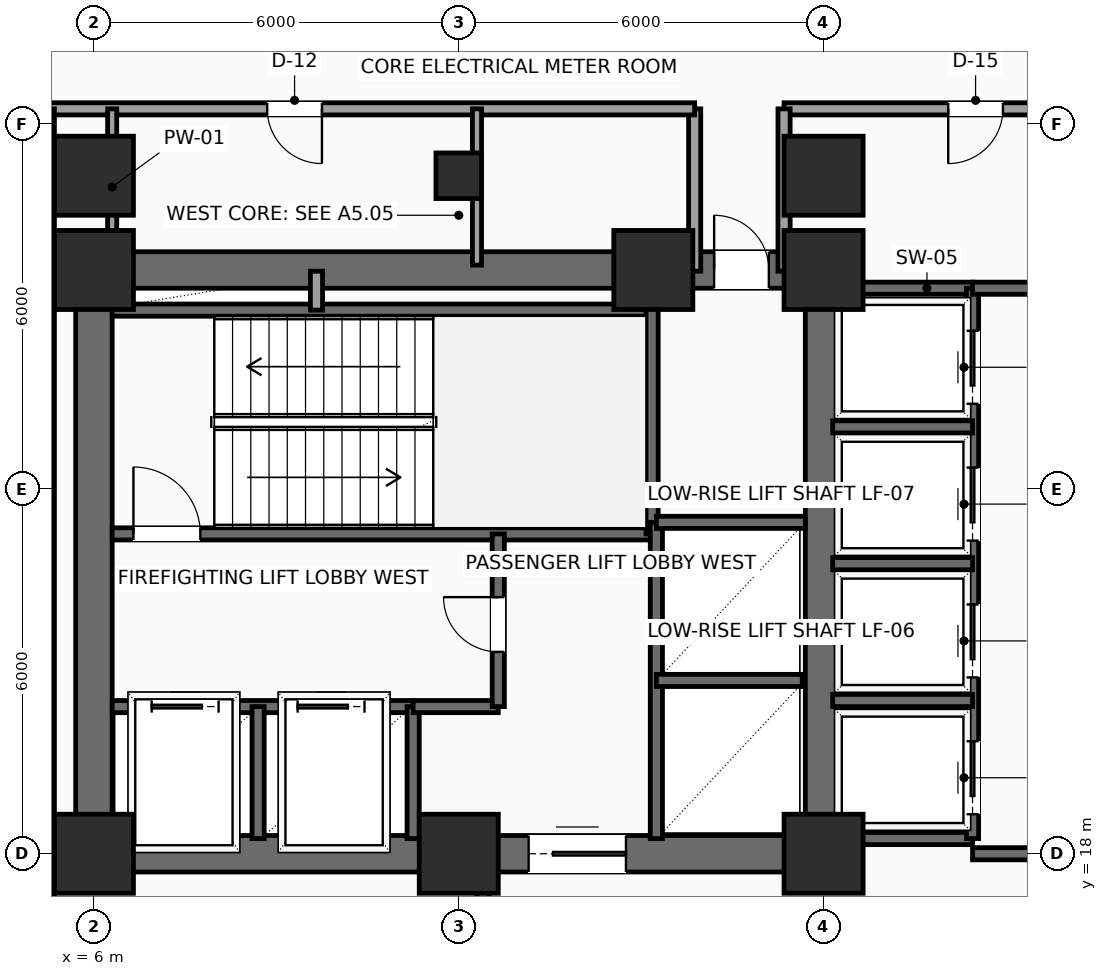
"""IFC4 building model, lengths in metres.
Left out: names, types, materials, properties, quantities, classifications, styles, units other than length and angle.
Written with IfcOpenShell. Run it as: python <this file> out.ifc"""

import sys

from ifc_helpers import new_model, si_unit, direction, frame, frame_2d, origin, origin_2d, place, context, subcontext, project, spatial, rectangle, hollow_rectangle, extrude, element, fill, save


model = new_model("IFC4")
c1 = context("Model", 3, precision=1e-05, world=origin(), true_north=direction((0.0, 1.0)))
c2 = subcontext(c1, "Body", "Model", "MODEL_VIEW")
j1 = project(units=[si_unit("LENGTHUNIT", "METRE"), si_unit("PLANEANGLEUNIT", "RADIAN")], contexts=[c1])
p1 = place(None, origin())
s1 = spatial("IfcSite", under=j1, at=p1, CompositionType="ELEMENT")
p2 = place(p1, origin())
s2 = spatial("IfcBuilding", under=s1, at=p2, CompositionType="ELEMENT")
p3 = place(p2, frame((0.0, 0.0, 90.9)))
s3 = spatial("IfcBuildingStorey", under=s2, at=p3, CompositionType="ELEMENT", Elevation=90.9)
for number, where, z_axis, x_axis in (
    (1, (6.0, 18.0, 0.0), (0.0, 0.0, 1.0), (1.0, 0.0, 0.0)),
    (2, (12.0, 18.0, 0.0), (0.0, 0.0, 1.0), (1.0, 0.0, 0.0)),
    (3, (18.0, 18.0, 0.0), (0.0, 0.0, 1.0), (1.0, 0.0, 0.0)),
    (4, (6.0, 27.6, 0.0), (0.0, 0.0, 1.0), (1.0, 0.0, 0.0)),
    (5, (15.2, 27.6, 0.0), (0.0, 0.0, 1.0), (1.0, 0.0, 0.0)),
    (6, (18.0, 27.6, 0.0), (0.0, 0.0, 1.0), (1.0, 0.0, 0.0)),
    (7, (6.0, 29.15, 0.0), (0.0, 0.0, 1.0), (1.0, 0.0, 0.0)),
):
    element("IfcColumn", number, at=place(p3, frame(where, z_axis=z_axis, x_axis=x_axis)), inside=s3, PredefinedType="COLUMN", context=c2, shape_type="SweptSolid", body=[
        extrude(rectangle(XDim=1.3, YDim=1.3, at=origin_2d()), origin(), (0.0, 0.0, 1.0), 3.9),
    ])
p4 = place(p3, frame((12.0, 29.15, 0.0), z_axis=(0.0, 0.0, 1.0), x_axis=(1.0, 0.0, 0.0)))
e8 = element("IfcColumn", 8, at=p4, inside=s3, PredefinedType="COLUMN", context=c2, shape_type="SweptSolid", body=[
    extrude(hollow_rectangle(XDim=0.75, YDim=0.75, WallThickness=0.035, InnerFilletRadius=0.035, OuterFilletRadius=0.05, at=origin_2d()), origin(), (0.0, 0.0, 1.0), 3.9),
])
p5 = place(p3, frame((18.0, 29.15, 0.0), z_axis=(0.0, 0.0, 1.0), x_axis=(1.0, 0.0, 0.0)))
e9 = element("IfcColumn", 9, at=p5, inside=s3, PredefinedType="COLUMN", context=c2, shape_type="SweptSolid", body=[
    extrude(rectangle(XDim=1.3, YDim=1.3, at=origin_2d()), origin(), (0.0, 0.0, 1.0), 3.9),
])
p6 = place(p3, frame((6.0, 18.0, 0.0), z_axis=(0.0, 0.0, 1.0), x_axis=(1.0, 0.0, 0.0)))
e10 = element("IfcWall", 10, at=p6, inside=s3, PredefinedType="SHEAR", context=c2, shape_type="SweptSolid", body=[
    extrude(rectangle(XDim=12.0, YDim=0.6, at=frame_2d((6.0, 0.0))), origin(), (0.0, 0.0, 1.0), 3.575),
])
p7 = place(p6, frame((7.15, 0.0, 0.0)))
e11 = element("IfcOpeningElement", 11, at=p7, cuts=e10, PredefinedType="OPENING", context=c2, shape_type="SweptSolid", body=[
    extrude(rectangle(XDim=1.6, YDim=2.3, at=frame_2d((0.8, 1.15))), frame((0.0, 0.31, 0.0), z_axis=(0.0, -1.0, 0.0), x_axis=(1.0, 0.0, 0.0)), (0.0, 0.0, 1.0), 0.62),
])
p8 = place(p3, frame((6.0, 27.6, 0.0), z_axis=(0.0, 0.0, 1.0), x_axis=(1.0, 0.0, 0.0)))
e12 = element("IfcWall", 12, at=p8, inside=s3, PredefinedType="SHEAR", context=c2, shape_type="SweptSolid", body=[
    extrude(rectangle(XDim=12.0, YDim=0.6, at=frame_2d((6.0, 0.0))), origin(), (0.0, 0.0, 1.0), 3.575),
])
p9 = place(p8, frame((10.2, 0.0, 0.0)))
e13 = element("IfcOpeningElement", 13, at=p9, cuts=e12, PredefinedType="OPENING", context=c2, shape_type="SweptSolid", body=[
    extrude(rectangle(XDim=0.9, YDim=2.15, at=frame_2d((0.45, 1.075))), frame((0.0, 0.31, 0.0), z_axis=(0.0, -1.0, 0.0), x_axis=(1.0, 0.0, 0.0)), (0.0, 0.0, 1.0), 0.62),
])
for number, where, z_axis, x_axis in (
    (14, (6.0, 18.0, 0.0), (0.0, 0.0, 1.0), (0.0, 1.0, 0.0)),
    (15, (18.0, 18.0, 0.0), (0.0, 0.0, 1.0), (0.0, 1.0, 0.0)),
):
    element("IfcWall", number, at=place(p3, frame(where, z_axis=z_axis, x_axis=x_axis)), inside=s3, PredefinedType="SHEAR", context=c2, shape_type="SweptSolid", body=[
        extrude(rectangle(XDim=9.6, YDim=0.6, at=frame_2d((4.8, 0.0))), origin(), (0.0, 0.0, 1.0), 3.575),
    ])
p10 = place(p3, frame((6.3, 23.26, 0.0), z_axis=(0.0, 0.0, 1.0), x_axis=(1.0, 0.0, 0.0)))
e16 = element("IfcWall", 16, at=p10, inside=s3, PredefinedType="SHEAR", context=c2, shape_type="SweptSolid", body=[
    extrude(rectangle(XDim=8.88, YDim=0.2, at=frame_2d((4.44, 0.0))), origin(), (0.0, 0.0, 1.0), 3.575),
])
p11 = place(p10, frame((0.35, 0.0, 0.0)))
e17 = element("IfcOpeningElement", 17, at=p11, cuts=e16, PredefinedType="OPENING", context=c2, shape_type="SweptSolid", body=[
    extrude(rectangle(XDim=1.1, YDim=2.2, at=frame_2d((0.55, 1.1))), frame((0.0, 0.11, 0.0), z_axis=(0.0, -1.0, 0.0), x_axis=(1.0, 0.0, 0.0)), (0.0, 0.0, 1.0), 0.22),
])
p12 = place(p3, frame((6.3, 26.94, 0.0), z_axis=(0.0, 0.0, 1.0), x_axis=(1.0, 0.0, 0.0)))
e18 = element("IfcWall", 18, at=p12, inside=s3, PredefinedType="SHEAR", context=c2, shape_type="SweptSolid", body=[
    extrude(rectangle(XDim=8.88, YDim=0.2, at=frame_2d((4.44, 0.0))), origin(), (0.0, 0.0, 1.0), 3.575),
])
p13 = place(p3, frame((15.18, 23.26, 0.0), z_axis=(0.0, 0.0, 1.0), x_axis=(0.0, 1.0, 0.0)))
e19 = element("IfcWall", 19, at=p13, inside=s3, PredefinedType="SHEAR", context=c2, shape_type="SweptSolid", body=[
    extrude(rectangle(XDim=4.04, YDim=0.2, at=frame_2d((2.02, 0.0))), origin(), (0.0, 0.0, 1.0), 3.575),
])
p14 = place(p3, frame((6.3, 20.42, 0.0), z_axis=(0.0, 0.0, 1.0), x_axis=(1.0, 0.0, 0.0)))
e20 = element("IfcWall", 20, at=p14, inside=s3, PredefinedType="SHEAR", context=c2, shape_type="SweptSolid", body=[
    extrude(rectangle(XDim=4.95, YDim=0.2, at=frame_2d((2.475, 0.0))), origin(), (0.0, 0.0, 1.0), 3.575),
])
p15 = place(p14, frame((0.65, 0.0, 0.0)))
e21 = element("IfcOpeningElement", 21, at=p15, cuts=e20, PredefinedType="OPENING", context=c2, shape_type="SweptSolid", body=[
    extrude(rectangle(XDim=1.1, YDim=2.2, at=frame_2d((0.55, 1.1))), frame((0.0, 0.11, 0.0), z_axis=(0.0, -1.0, 0.0), x_axis=(1.0, 0.0, 0.0)), (0.0, 0.0, 1.0), 0.22),
])
p16 = place(p14, frame((3.05, 0.0, 0.0)))
e22 = element("IfcOpeningElement", 22, at=p16, cuts=e20, PredefinedType="OPENING", context=c2, shape_type="SweptSolid", body=[
    extrude(rectangle(XDim=1.1, YDim=2.2, at=frame_2d((0.55, 1.1))), frame((0.0, 0.11, 0.0), z_axis=(0.0, -1.0, 0.0), x_axis=(1.0, 0.0, 0.0)), (0.0, 0.0, 1.0), 0.22),
])
for number, where, z_axis, x_axis in (
    (23, (8.7, 18.25, 0.0), (0.0, 0.0, 1.0), (0.0, 1.0, 0.0)),
    (24, (11.25, 18.25, 0.0), (0.0, 0.0, 1.0), (0.0, 1.0, 0.0)),
):
    element("IfcWall", number, at=place(p3, frame(where, z_axis=z_axis, x_axis=x_axis)), inside=s3, PredefinedType="SHEAR", context=c2, shape_type="SweptSolid", body=[
        extrude(rectangle(XDim=2.17, YDim=0.2, at=frame_2d((1.085, 0.0))), origin(), (0.0, 0.0, 1.0), 3.575),
    ])
p17 = place(p3, frame((11.25, 20.42, 0.0), z_axis=(0.0, 0.0, 1.0), x_axis=(1.0, 0.0, 0.0)))
e25 = element("IfcWall", 25, at=p17, inside=s3, PredefinedType="SHEAR", context=c2, shape_type="SweptSolid", body=[
    extrude(rectangle(XDim=1.4, YDim=0.2, at=frame_2d((0.7, 0.0))), origin(), (0.0, 0.0, 1.0), 3.575),
])
p18 = place(p3, frame((12.65, 20.42, 0.0), z_axis=(0.0, 0.0, 1.0), x_axis=(0.0, 1.0, 0.0)))
e26 = element("IfcWall", 26, at=p18, inside=s3, PredefinedType="SHEAR", context=c2, shape_type="SweptSolid", body=[
    extrude(rectangle(XDim=2.84, YDim=0.2, at=frame_2d((1.42, 0.0))), origin(), (0.0, 0.0, 1.0), 3.575),
])
p19 = place(p18, frame((0.9, 0.0, 0.0)))
e27 = element("IfcOpeningElement", 27, at=p19, cuts=e26, PredefinedType="OPENING", context=c2, shape_type="SweptSolid", body=[
    extrude(rectangle(XDim=0.9, YDim=2.15, at=frame_2d((0.45, 1.075))), frame((0.0, 0.11, 0.0), z_axis=(0.0, -1.0, 0.0), x_axis=(1.0, 0.0, 0.0)), (0.0, 0.0, 1.0), 0.22),
])
p20 = place(p3, frame((9.66, 26.94, 0.0), z_axis=(0.0, 0.0, 1.0), x_axis=(0.0, 1.0, 0.0)))
e28 = element("IfcWall", 28, at=p20, inside=s3, PredefinedType="SOLIDWALL", context=c2, shape_type="SweptSolid", body=[
    extrude(rectangle(XDim=0.64, YDim=0.2, at=frame_2d((0.32, 0.0))), origin(), (0.0, 0.0, 1.0), 3.575),
])
p21 = place(p3, frame((15.25, 18.25, 0.0), z_axis=(0.0, 0.0, 1.0), x_axis=(0.0, 1.0, 0.0)))
e29 = element("IfcWall", 29, at=p21, inside=s3, PredefinedType="SHEAR", context=c2, shape_type="SweptSolid", body=[
    extrude(rectangle(XDim=5.2, YDim=0.2, at=frame_2d((2.6, 0.0))), origin(), (0.0, 0.0, 1.0), 3.575),
])
p22 = place(p3, frame((15.25, 20.85, 0.0), z_axis=(0.0, 0.0, 1.0), x_axis=(1.0, 0.0, 0.0)))
e30 = element("IfcWall", 30, at=p22, inside=s3, PredefinedType="SHEAR", context=c2, shape_type="SweptSolid", body=[
    extrude(rectangle(XDim=2.4, YDim=0.2, at=frame_2d((1.2, 0.0))), origin(), (0.0, 0.0, 1.0), 3.575),
])
p23 = place(p3, frame((15.25, 23.45, 0.0), z_axis=(0.0, 0.0, 1.0), x_axis=(1.0, 0.0, 0.0)))
e31 = element("IfcWall", 31, at=p23, inside=s3, PredefinedType="SHEAR", context=c2, shape_type="SweptSolid", body=[
    extrude(rectangle(XDim=2.45, YDim=0.2, at=frame_2d((1.225, 0.0))), origin(), (0.0, 0.0, 1.0), 3.575),
])
for number, where, z_axis, x_axis in (
    (32, (18.1, 27.3, 0.0), (0.0, 0.0, 1.0), (1.0, 0.0, 0.0)),
    (33, (18.1, 18.25, 0.0), (0.0, 0.0, 1.0), (1.0, 0.0, 0.0)),
):
    element("IfcWall", number, at=place(p3, frame(where, z_axis=z_axis, x_axis=x_axis)), inside=s3, PredefinedType="SHEAR", context=c2, shape_type="SweptSolid", body=[
        extrude(rectangle(XDim=2.35, YDim=0.2, at=frame_2d((1.175, 0.0))), origin(), (0.0, 0.0, 1.0), 3.575),
    ])
p24 = place(p3, frame((20.45, 18.25, 0.0), z_axis=(0.0, 0.0, 1.0), x_axis=(0.0, 1.0, 0.0)))
e34 = element("IfcWall", 34, at=p24, inside=s3, PredefinedType="SHEAR", context=c2, shape_type="SweptSolid", body=[
    extrude(rectangle(XDim=9.05, YDim=0.2, at=frame_2d((4.525, 0.0))), origin(), (0.0, 0.0, 1.0), 3.575),
])
p25 = place(p24, frame((0.4, 0.0, 0.0)))
e35 = element("IfcOpeningElement", 35, at=p25, cuts=e34, PredefinedType="OPENING", context=c2, shape_type="SweptSolid", body=[
    extrude(rectangle(XDim=1.2, YDim=2.2, at=frame_2d((0.6, 1.1))), frame((0.0, 0.11, 0.0), z_axis=(0.0, -1.0, 0.0), x_axis=(1.0, 0.0, 0.0)), (0.0, 0.0, 1.0), 0.22),
])
p26 = place(p24, frame((2.65, 0.0, 0.0)))
e36 = element("IfcOpeningElement", 36, at=p26, cuts=e34, PredefinedType="OPENING", context=c2, shape_type="SweptSolid", body=[
    extrude(rectangle(XDim=1.2, YDim=2.2, at=frame_2d((0.6, 1.1))), frame((0.0, 0.11, 0.0), z_axis=(0.0, -1.0, 0.0), x_axis=(1.0, 0.0, 0.0)), (0.0, 0.0, 1.0), 0.22),
])
p27 = place(p24, frame((4.9, 0.0, 0.0)))
e37 = element("IfcOpeningElement", 37, at=p27, cuts=e34, PredefinedType="OPENING", context=c2, shape_type="SweptSolid", body=[
    extrude(rectangle(XDim=1.2, YDim=2.2, at=frame_2d((0.6, 1.1))), frame((0.0, 0.11, 0.0), z_axis=(0.0, -1.0, 0.0), x_axis=(1.0, 0.0, 0.0)), (0.0, 0.0, 1.0), 0.22),
])
p28 = place(p24, frame((7.15, 0.0, 0.0)))
e38 = element("IfcOpeningElement", 38, at=p28, cuts=e34, PredefinedType="OPENING", context=c2, shape_type="SweptSolid", body=[
    extrude(rectangle(XDim=1.2, YDim=2.2, at=frame_2d((0.6, 1.1))), frame((0.0, 0.11, 0.0), z_axis=(0.0, -1.0, 0.0), x_axis=(1.0, 0.0, 0.0)), (0.0, 0.0, 1.0), 0.22),
])
for number, where, z_axis, x_axis in (
    (39, (18.15, 20.52, 0.0), (0.0, 0.0, 1.0), (1.0, 0.0, 0.0)),
    (40, (18.15, 22.77, 0.0), (0.0, 0.0, 1.0), (1.0, 0.0, 0.0)),
    (41, (18.15, 25.02, 0.0), (0.0, 0.0, 1.0), (1.0, 0.0, 0.0)),
):
    element("IfcWall", number, at=place(p3, frame(where, z_axis=z_axis, x_axis=x_axis)), inside=s3, PredefinedType="SHEAR", context=c2, shape_type="SweptSolid", body=[
        extrude(rectangle(XDim=2.3, YDim=0.2, at=frame_2d((1.15, 0.0))), origin(), (0.0, 0.0, 1.0), 3.575),
    ])
p29 = place(p3, frame((20.45, 18.0, 0.0), z_axis=(0.0, 0.0, 1.0), x_axis=(1.0, 0.0, 0.0)))
e42 = element("IfcWall", 42, at=p29, inside=s3, PredefinedType="SHEAR", context=c2, shape_type="SweptSolid", body=[
    extrude(rectangle(XDim=3.5, YDim=0.2, at=frame_2d((1.75, 0.0))), origin(), (0.0, 0.0, 1.0), 3.575),
])
p30 = place(p29, frame((0.95, 0.0, 0.0)))
e43 = element("IfcOpeningElement", 43, at=p30, cuts=e42, PredefinedType="OPENING", context=c2, shape_type="SweptSolid", body=[
    extrude(rectangle(XDim=1.6, YDim=2.3, at=frame_2d((0.8, 1.15))), frame((0.0, 0.11, 0.0), z_axis=(0.0, -1.0, 0.0), x_axis=(1.0, 0.0, 0.0)), (0.0, 0.0, 1.0), 0.22),
])
p31 = place(p3, frame((20.45, 27.3, 0.0), z_axis=(0.0, 0.0, 1.0), x_axis=(1.0, 0.0, 0.0)))
e44 = element("IfcWall", 44, at=p31, inside=s3, PredefinedType="SHEAR", context=c2, shape_type="SweptSolid", body=[
    extrude(rectangle(XDim=3.5, YDim=0.2, at=frame_2d((1.75, 0.0))), origin(), (0.0, 0.0, 1.0), 3.575),
])
p32 = place(p3, frame((23.7, 30.25, 0.0), z_axis=(0.0, 0.0, 1.0), x_axis=(-1.0, 0.0, 0.0)))
e45 = element("IfcWall", 45, at=p32, inside=s3, PredefinedType="SOLIDWALL", context=c2, shape_type="SweptSolid", body=[
    extrude(rectangle(XDim=6.35, YDim=0.2, at=frame_2d((3.175, 0.0))), origin(), (0.0, 0.0, 1.0), 3.575),
])
p33 = place(p32, frame((2.75, 0.0, 0.0)))
e46 = element("IfcOpeningElement", 46, at=p33, cuts=e45, PredefinedType="OPENING", context=c2, shape_type="SweptSolid", body=[
    extrude(rectangle(XDim=0.9, YDim=2.1, at=frame_2d((0.45, 1.05))), frame((0.0, 0.11, 0.0), z_axis=(0.0, -1.0, 0.0), x_axis=(1.0, 0.0, 0.0)), (0.0, 0.0, 1.0), 0.22),
])
for number, where, z_axis, x_axis in (
    (47, (17.35, 30.25, 0.0), (0.0, 0.0, 1.0), (0.0, -1.0, 0.0)),
    (48, (15.88, 27.58, 0.0), (0.0, 0.0, 1.0), (0.0, 1.0, 0.0)),
):
    element("IfcWall", number, at=place(p3, frame(where, z_axis=z_axis, x_axis=x_axis)), inside=s3, PredefinedType="SOLIDWALL", context=c2, shape_type="SweptSolid", body=[
        extrude(rectangle(XDim=2.67, YDim=0.2, at=frame_2d((1.335, 0.0))), origin(), (0.0, 0.0, 1.0), 3.575),
    ])
p34 = place(p3, frame((15.88, 30.25, 0.0), z_axis=(0.0, 0.0, 1.0), x_axis=(-1.0, 0.0, 0.0)))
e49 = element("IfcWall", 49, at=p34, inside=s3, PredefinedType="SOLIDWALL", context=c2, shape_type="SweptSolid", body=[
    extrude(rectangle(XDim=10.63, YDim=0.2, at=frame_2d((5.315, 0.0))), origin(), (0.0, 0.0, 1.0), 3.575),
])
p35 = place(p34, frame((6.13, 0.0, 0.0)))
e50 = element("IfcOpeningElement", 50, at=p35, cuts=e49, PredefinedType="OPENING", context=c2, shape_type="SweptSolid", body=[
    extrude(rectangle(XDim=0.9, YDim=2.1, at=frame_2d((0.45, 1.05))), frame((0.0, 0.11, 0.0), z_axis=(0.0, -1.0, 0.0), x_axis=(1.0, 0.0, 0.0)), (0.0, 0.0, 1.0), 0.22),
])
p36 = place(p3, frame((5.25, 30.25, 0.0), z_axis=(0.0, 0.0, 1.0), x_axis=(0.0, -1.0, 0.0)))
e51 = element("IfcWall", 51, at=p36, inside=s3, PredefinedType="SOLIDWALL", context=c2, shape_type="SweptSolid", body=[
    extrude(rectangle(XDim=13.35, YDim=0.2, at=frame_2d((6.675, 0.0))), origin(), (0.0, 0.0, 1.0), 3.575),
])
p37 = place(p3, frame((12.4, 16.9, 0.0), z_axis=(0.0, 0.0, 1.0), x_axis=(0.0, 1.0, 0.0)))
e52 = element("IfcWall", 52, at=p37, inside=s3, PredefinedType="SOLIDWALL", context=c2, shape_type="SweptSolid", body=[
    extrude(rectangle(XDim=1.05, YDim=0.2, at=frame_2d((0.525, 0.0))), origin(), (0.0, 0.0, 1.0), 3.575),
])
for number, where, z_axis, x_axis in (
    (53, (6.3, 27.68, 0.0), (0.0, 0.0, 1.0), (0.0, 1.0, 0.0)),
    (54, (12.3, 27.68, 0.0), (0.0, 0.0, 1.0), (0.0, 1.0, 0.0)),
):
    element("IfcWall", number, at=place(p3, frame(where, z_axis=z_axis, x_axis=x_axis)), inside=s3, PredefinedType="PARTITIONING", context=c2, shape_type="SweptSolid", body=[
        extrude(rectangle(XDim=2.57, YDim=0.15, at=frame_2d((1.285, 0.0))), origin(), (0.0, 0.0, 1.0), 2.917),
    ])
p38 = place(p7, origin())
e55 = element("IfcDoor", 55, at=p38, inside=s3, OperationType="DOUBLE_DOOR_SLIDING", PredefinedType="DOOR", context=c2, shape_type="SweptSolid", body=[
    extrude(rectangle(XDim=1.6, YDim=2.3, at=frame_2d((0.8, 1.15))), frame((0.0, 0.025, 0.0), z_axis=(0.0, -1.0, 0.0), x_axis=(1.0, 0.0, 0.0)), (0.0, 0.0, 1.0), 0.05),
])
fill(e11, e55)
p39 = place(p9, origin())
e56 = element("IfcDoor", 56, at=p39, inside=s3, OperationType="SINGLE_SWING_LEFT", PredefinedType="DOOR", context=c2, shape_type="SweptSolid", body=[
    extrude(rectangle(XDim=0.9, YDim=2.15, at=frame_2d((0.45, 1.075))), frame((0.0, 0.025, 0.0), z_axis=(0.0, -1.0, 0.0), x_axis=(1.0, 0.0, 0.0)), (0.0, 0.0, 1.0), 0.05),
])
fill(e13, e56)
p40 = place(p11, origin())
e57 = element("IfcDoor", 57, at=p40, inside=s3, OperationType="SINGLE_SWING_LEFT", PredefinedType="DOOR", context=c2, shape_type="SweptSolid", body=[
    extrude(rectangle(XDim=1.1, YDim=2.2, at=frame_2d((0.55, 1.1))), frame((0.0, 0.025, 0.0), z_axis=(0.0, -1.0, 0.0), x_axis=(1.0, 0.0, 0.0)), (0.0, 0.0, 1.0), 0.05),
])
fill(e17, e57)
p41 = place(p15, origin())
e58 = element("IfcDoor", 58, at=p41, inside=s3, OperationType="SLIDING_TO_LEFT", PredefinedType="DOOR", context=c2, shape_type="SweptSolid", body=[
    extrude(rectangle(XDim=1.1, YDim=2.2, at=frame_2d((0.55, 1.1))), frame((0.0, 0.025, 0.0), z_axis=(0.0, -1.0, 0.0), x_axis=(1.0, 0.0, 0.0)), (0.0, 0.0, 1.0), 0.05),
])
fill(e21, e58)
p42 = place(p16, origin())
e59 = element("IfcDoor", 59, at=p42, inside=s3, OperationType="SLIDING_TO_LEFT", PredefinedType="DOOR", context=c2, shape_type="SweptSolid", body=[
    extrude(rectangle(XDim=1.1, YDim=2.2, at=frame_2d((0.55, 1.1))), frame((0.0, 0.025, 0.0), z_axis=(0.0, -1.0, 0.0), x_axis=(1.0, 0.0, 0.0)), (0.0, 0.0, 1.0), 0.05),
])
fill(e22, e59)
p43 = place(p19, origin())
e60 = element("IfcDoor", 60, at=p43, inside=s3, OperationType="SINGLE_SWING_RIGHT", PredefinedType="DOOR", context=c2, shape_type="SweptSolid", body=[
    extrude(rectangle(XDim=0.9, YDim=2.15, at=frame_2d((0.45, 1.075))), frame((0.0, 0.025, 0.0), z_axis=(0.0, -1.0, 0.0), x_axis=(1.0, 0.0, 0.0)), (0.0, 0.0, 1.0), 0.05),
])
fill(e27, e60)
p44 = place(p25, origin())
e61 = element("IfcDoor", 61, at=p44, inside=s3, OperationType="SLIDING_TO_RIGHT", PredefinedType="DOOR", context=c2, shape_type="SweptSolid", body=[
    extrude(rectangle(XDim=1.2, YDim=2.2, at=frame_2d((0.6, 1.1))), frame((0.0, 0.025, 0.0), z_axis=(0.0, -1.0, 0.0), x_axis=(1.0, 0.0, 0.0)), (0.0, 0.0, 1.0), 0.05),
])
fill(e35, e61)
p45 = place(p26, origin())
e62 = element("IfcDoor", 62, at=p45, inside=s3, OperationType="SLIDING_TO_RIGHT", PredefinedType="DOOR", context=c2, shape_type="SweptSolid", body=[
    extrude(rectangle(XDim=1.2, YDim=2.2, at=frame_2d((0.6, 1.1))), frame((0.0, 0.025, 0.0), z_axis=(0.0, -1.0, 0.0), x_axis=(1.0, 0.0, 0.0)), (0.0, 0.0, 1.0), 0.05),
])
fill(e36, e62)
p46 = place(p27, origin())
e63 = element("IfcDoor", 63, at=p46, inside=s3, OperationType="SLIDING_TO_RIGHT", PredefinedType="DOOR", context=c2, shape_type="SweptSolid", body=[
    extrude(rectangle(XDim=1.2, YDim=2.2, at=frame_2d((0.6, 1.1))), frame((0.0, 0.025, 0.0), z_axis=(0.0, -1.0, 0.0), x_axis=(1.0, 0.0, 0.0)), (0.0, 0.0, 1.0), 0.05),
])
fill(e37, e63)
p47 = place(p28, origin())
e64 = element("IfcDoor", 64, at=p47, inside=s3, OperationType="SLIDING_TO_RIGHT", PredefinedType="DOOR", context=c2, shape_type="SweptSolid", body=[
    extrude(rectangle(XDim=1.2, YDim=2.2, at=frame_2d((0.6, 1.1))), frame((0.0, 0.025, 0.0), z_axis=(0.0, -1.0, 0.0), x_axis=(1.0, 0.0, 0.0)), (0.0, 0.0, 1.0), 0.05),
])
fill(e38, e64)
p48 = place(p33, origin())
e65 = element("IfcDoor", 65, at=p48, inside=s3, OperationType="SINGLE_SWING_RIGHT", PredefinedType="DOOR", context=c2, shape_type="SweptSolid", body=[
    extrude(rectangle(XDim=0.9, YDim=2.1, at=frame_2d((0.45, 1.05))), frame((0.0, 0.025, 0.0), z_axis=(0.0, -1.0, 0.0), x_axis=(1.0, 0.0, 0.0)), (0.0, 0.0, 1.0), 0.05),
])
fill(e46, e65)
p49 = place(p35, origin())
e66 = element("IfcDoor", 66, at=p49, inside=s3, OperationType="SINGLE_SWING_LEFT", PredefinedType="DOOR", context=c2, shape_type="SweptSolid", body=[
    extrude(rectangle(XDim=0.9, YDim=2.1, at=frame_2d((0.45, 1.05))), frame((0.0, 0.025, 0.0), z_axis=(0.0, -1.0, 0.0), x_axis=(1.0, 0.0, 0.0)), (0.0, 0.0, 1.0), 0.05),
])
fill(e50, e66)
save(model, sys.argv[1])
